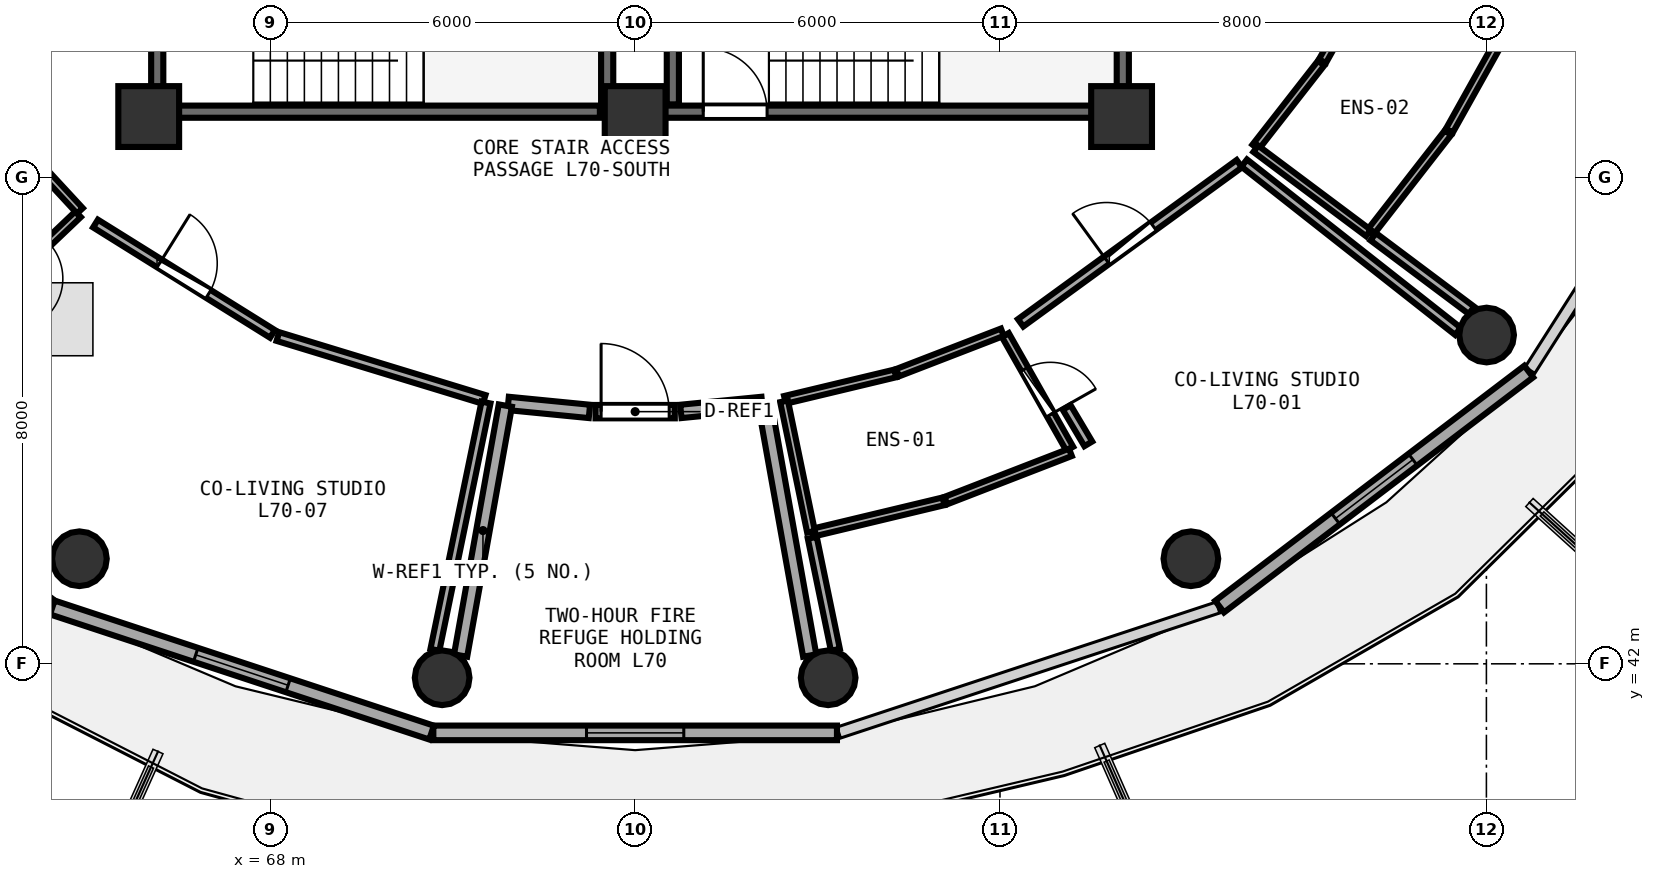
"""IFC4 building model, lengths in metres.
Left out: names, types, materials, properties, quantities, classifications, styles, units other than length and angle.
Written with IfcOpenShell. Run it as: python <this file> out.ifc"""

import sys

from ifc_helpers import new_model, si_unit, direction, frame, frame_2d, origin, origin_2d, place, context, subcontext, project, spatial, rectangle, circle, extrude, element, fill, save


model = new_model("IFC4")
c1 = context("Model", 3, precision=1e-05, world=origin(), true_north=direction((0.0, 1.0)))
c2 = subcontext(c1, "Body", "Model", "MODEL_VIEW")
j1 = project(units=[si_unit("LENGTHUNIT", "METRE"), si_unit("PLANEANGLEUNIT", "RADIAN")], contexts=[c1])
p1 = place(None, origin())
s1 = spatial("IfcSite", under=j1, at=p1, CompositionType="ELEMENT")
p2 = place(p1, origin())
s2 = spatial("IfcBuilding", under=s1, at=p2, CompositionType="ELEMENT")
p3 = place(p2, frame((0.0, 0.0, 274.95)))
s3 = spatial("IfcBuildingStorey", under=s2, at=p3, CompositionType="ELEMENT", Elevation=274.95)
for number, where, z_axis, x_axis in (
    (1, (66.0, 51.0, 0.0), (0.0, 0.0, 1.0), (1.0, 0.0, 0.0)),
    (2, (74.0, 51.0, 0.0), (0.0, 0.0, 1.0), (1.0, 0.0, 0.0)),
    (3, (82.0, 51.0, 0.0), (0.0, 0.0, 1.0), (1.0, 0.0, 0.0)),
):
    element("IfcColumn", number, at=place(p3, frame(where, z_axis=z_axis, x_axis=x_axis)), inside=s3, PredefinedType="PILASTER", context=c2, shape_type="SweptSolid", body=[
        extrude(rectangle(XDim=1.0, YDim=1.0, at=origin_2d()), origin(), (0.0, 0.0, 1.0), 3.75),
    ])
for number, where, z_axis, x_axis in (
    (4, (64.86, 43.728, 0.0), (0.0, 0.0, 1.0), (1.0, 0.0, 0.0)),
    (5, (70.826, 41.771, 0.0), (0.0, 0.0, 1.0), (1.0, 0.0, 0.0)),
    (6, (77.174, 41.771, 0.0), (0.0, 0.0, 1.0), (1.0, 0.0, 0.0)),
    (7, (83.14, 43.728, 0.0), (0.0, 0.0, 1.0), (1.0, 0.0, 0.0)),
    (8, (88.003, 47.407, 0.0), (0.0, 0.0, 1.0), (1.0, 0.0, 0.0)),
):
    element("IfcColumn", number, at=place(p3, frame(where, z_axis=z_axis, x_axis=x_axis)), inside=s3, PredefinedType="COLUMN", context=c2, shape_type="SweptSolid", body=[
        extrude(circle(Radius=0.45, at=origin_2d()), origin(), (0.0, 0.0, 1.0), 3.75),
    ])
p4 = place(p3, frame((59.304, 46.806, 0.0), z_axis=(0.0, 0.0, 1.0), x_axis=(0.796010444211, -0.605282886514, 0.0)))
e9 = element("IfcWall", 9, at=p4, inside=s3, PredefinedType="SOLIDWALL", context=c2, shape_type="SweptSolid", body=[
    extrude(rectangle(XDim=6.387, YDim=0.24, at=frame_2d((3.194, 0.0))), origin(), (0.0, 0.0, 1.0), 3.475),
])
p5 = place(p4, frame((2.394, 0.0, 0.85)))
e10 = element("IfcOpeningElement", 10, at=p5, cuts=e9, PredefinedType="OPENING", context=c2, shape_type="SweptSolid", body=[
    extrude(rectangle(XDim=1.6, YDim=1.45, at=frame_2d((0.8, 0.725))), frame((0.0, 0.13, 0.0), z_axis=(0.0, -1.0, 0.0), x_axis=(1.0, 0.0, 0.0)), (0.0, 0.0, 1.0), 0.26),
])
p6 = place(p3, frame((64.414, 42.927, 0.0), z_axis=(0.0, 0.0, 1.0), x_axis=(0.949663708393, -0.313271193954, 0.0)))
e11 = element("IfcWall", 11, at=p6, inside=s3, PredefinedType="SOLIDWALL", context=c2, shape_type="SweptSolid", body=[
    extrude(rectangle(XDim=6.568, YDim=0.24, at=frame_2d((3.284, 0.0))), origin(), (0.0, 0.0, 1.0), 3.475),
])
p7 = place(p6, frame((2.484, 0.0, 0.85)))
e12 = element("IfcOpeningElement", 12, at=p7, cuts=e11, PredefinedType="OPENING", context=c2, shape_type="SweptSolid", body=[
    extrude(rectangle(XDim=1.6, YDim=1.45, at=frame_2d((0.8, 0.725))), frame((0.0, 0.13, 0.0), z_axis=(0.0, -1.0, 0.0), x_axis=(1.0, 0.0, 0.0)), (0.0, 0.0, 1.0), 0.26),
])
p8 = place(p3, frame((70.681, 40.864, 0.0), z_axis=(0.0, 0.0, 1.0), x_axis=(1.0, 0.0, 0.0)))
e13 = element("IfcWall", 13, at=p8, inside=s3, PredefinedType="SOLIDWALL", context=c2, shape_type="SweptSolid", body=[
    extrude(rectangle(XDim=6.638, YDim=0.24, at=frame_2d((3.319, 0.0))), origin(), (0.0, 0.0, 1.0), 3.475),
])
p9 = place(p8, frame((2.519, 0.0, 0.85)))
e14 = element("IfcOpeningElement", 14, at=p9, cuts=e13, PredefinedType="OPENING", context=c2, shape_type="SweptSolid", body=[
    extrude(rectangle(XDim=1.6, YDim=1.45, at=frame_2d((0.8, 0.725))), frame((0.0, 0.13, 0.0), z_axis=(0.0, -1.0, 0.0), x_axis=(1.0, 0.0, 0.0)), (0.0, 0.0, 1.0), 0.26),
])
p10 = place(p3, frame((83.612, 42.94, 0.0), z_axis=(0.0, 0.0, 1.0), x_axis=(0.796010444211, 0.605282886514, 0.0)))
e15 = element("IfcWall", 15, at=p10, inside=s3, PredefinedType="SOLIDWALL", context=c2, shape_type="SweptSolid", body=[
    extrude(rectangle(XDim=6.387, YDim=0.24, at=frame_2d((3.194, 0.0))), origin(), (0.0, 0.0, 1.0), 3.475),
])
p11 = place(p10, frame((2.394, 0.0, 0.85)))
e16 = element("IfcOpeningElement", 16, at=p11, cuts=e15, PredefinedType="OPENING", context=c2, shape_type="SweptSolid", body=[
    extrude(rectangle(XDim=1.6, YDim=1.45, at=frame_2d((0.8, 0.725))), frame((0.0, 0.13, 0.0), z_axis=(0.0, -1.0, 0.0), x_axis=(1.0, 0.0, 0.0)), (0.0, 0.0, 1.0), 0.26),
])
p12 = place(p3, frame((74.0, 51.08, 0.0), z_axis=(0.0, 0.0, 1.0), x_axis=(1.0, 0.0, 0.0)))
e17 = element("IfcWall", 17, at=p12, inside=s3, PredefinedType="SHEAR", context=c2, shape_type="SweptSolid", body=[
    extrude(rectangle(XDim=7.9, YDim=0.2, at=frame_2d((3.95, 0.0))), origin(), (0.0, 0.0, 1.0), 3.49),
])
p13 = place(p12, frame((1.12, 0.0, 0.0)))
e18 = element("IfcOpeningElement", 18, at=p13, cuts=e17, PredefinedType="OPENING", context=c2, shape_type="SweptSolid", body=[
    extrude(rectangle(XDim=1.05, YDim=2.1, at=frame_2d((0.525, 1.05))), frame((0.0, 0.11, 0.0), z_axis=(0.0, -1.0, 0.0), x_axis=(1.0, 0.0, 0.0)), (0.0, 0.0, 1.0), 0.22),
])
for number, where, z_axis, x_axis in (
    (19, (82.02, 51.2, 0.0), (0.0, 0.0, 1.0), (0.0, 1.0, 0.0)),
    (20, (74.62, 54.27, 0.0), (0.0, 0.0, 1.0), (0.0, -1.0, 0.0)),
):
    element("IfcWall", number, at=place(p3, frame(where, z_axis=z_axis, x_axis=x_axis)), inside=s3, PredefinedType="SHEAR", context=c2, shape_type="SweptSolid", body=[
        extrude(rectangle(XDim=3.07, YDim=0.2, at=frame_2d((1.535, 0.0))), origin(), (0.0, 0.0, 1.0), 3.49),
    ])
p14 = place(p3, frame((66.26, 51.08, 0.0), z_axis=(0.0, 0.0, 1.0), x_axis=(1.0, 0.0, 0.0)))
e21 = element("IfcWall", 21, at=p14, inside=s3, PredefinedType="SHEAR", context=c2, shape_type="SweptSolid", body=[
    extrude(rectangle(XDim=7.16, YDim=0.2, at=frame_2d((3.58, 0.0))), origin(), (0.0, 0.0, 1.0), 3.49),
])
p15 = place(p3, frame((73.54, 51.2, 0.0), z_axis=(0.0, 0.0, 1.0), x_axis=(0.0, 1.0, 0.0)))
e22 = element("IfcWall", 22, at=p15, inside=s3, PredefinedType="SHEAR", context=c2, shape_type="SweptSolid", body=[
    extrude(rectangle(XDim=3.07, YDim=0.2, at=frame_2d((1.535, 0.0))), origin(), (0.0, 0.0, 1.0), 3.49),
])
p16 = place(p3, frame((66.14, 54.27, 0.0), z_axis=(0.0, 0.0, 1.0), x_axis=(0.0, -1.0, 0.0)))
e23 = element("IfcWall", 23, at=p16, inside=s3, PredefinedType="SHEAR", context=c2, shape_type="SweptSolid", body=[
    extrude(rectangle(XDim=3.07, YDim=0.2, at=frame_2d((1.535, 0.0))), origin(), (0.0, 0.0, 1.0), 3.49),
])
p17 = place(p16, frame((1.01, 0.0, 0.0)))
e24 = element("IfcOpeningElement", 24, at=p17, cuts=e23, PredefinedType="OPENING", context=c2, shape_type="SweptSolid", body=[
    extrude(rectangle(XDim=1.05, YDim=2.1, at=frame_2d((0.525, 1.05))), frame((0.0, 0.11, 0.0), z_axis=(0.0, -1.0, 0.0), x_axis=(1.0, 0.0, 0.0)), (0.0, 0.0, 1.0), 0.22),
])
p18 = place(p3, frame((73.348, 46.147, 0.0), z_axis=(0.0, 0.0, 1.0), x_axis=(1.0, 0.0, 0.0)))
e25 = element("IfcWall", 25, at=p18, inside=s3, PredefinedType="SOLIDWALL", context=c2, shape_type="SweptSolid", body=[
    extrude(rectangle(XDim=1.304, YDim=0.22, at=frame_2d((0.652, 0.0))), origin(), (0.0, 0.0, 1.0), 3.48),
])
p19 = place(p18, frame((0.092, 0.0, 0.0)))
e26 = element("IfcOpeningElement", 26, at=p19, cuts=e25, PredefinedType="OPENING", context=c2, shape_type="SweptSolid", body=[
    extrude(rectangle(XDim=1.12, YDim=2.1, at=frame_2d((0.56, 1.05))), frame((0.0, 0.12, 0.0), z_axis=(0.0, -1.0, 0.0), x_axis=(1.0, 0.0, 0.0)), (0.0, 0.0, 1.0), 0.24),
])
p20 = place(p3, frame((80.088, 47.408, 0.0), z_axis=(0.0, 0.0, 1.0), x_axis=(0.492943806894, -0.870061149141, 0.0)))
e27 = element("IfcWall", 27, at=p20, inside=s3, PredefinedType="PLUMBINGWALL", context=c2, shape_type="SweptSolid", body=[
    extrude(rectangle(XDim=2.15, YDim=0.13, at=frame_2d((1.075, 0.0))), origin(), (0.0, 0.0, 1.0), 3.175),
])
p21 = place(p20, frame((0.645, 0.0, 0.0)))
e28 = element("IfcOpeningElement", 28, at=p21, cuts=e27, PredefinedType="OPENING", context=c2, shape_type="SweptSolid", body=[
    extrude(rectangle(XDim=0.86, YDim=2.05, at=frame_2d((0.43, 1.025))), frame((0.0, 0.075, 0.0), z_axis=(0.0, -1.0, 0.0), x_axis=(1.0, 0.0, 0.0)), (0.0, 0.0, 1.0), 0.15),
])
p22 = place(p3, frame((80.34, 47.607, 0.0), z_axis=(0.0, 0.0, 1.0), x_axis=(0.808603155837, 0.588354430909, 0.0)))
e29 = element("IfcWall", 29, at=p22, inside=s3, PredefinedType="PARTITIONING", context=c2, shape_type="SweptSolid", body=[
    extrude(rectangle(XDim=4.448, YDim=0.15, at=frame_2d((2.224, 0.0))), origin(), (0.0, 0.0, 1.0), 3.075),
])
p23 = place(p22, frame((1.749, 0.0, 0.0)))
e30 = element("IfcOpeningElement", 30, at=p23, cuts=e29, PredefinedType="OPENING", context=c2, shape_type="SweptSolid", body=[
    extrude(rectangle(XDim=0.95, YDim=2.08, at=frame_2d((0.475, 1.04))), frame((0.0, 0.085, 0.0), z_axis=(0.0, -1.0, 0.0), x_axis=(1.0, 0.0, 0.0)), (0.0, 0.0, 1.0), 0.17),
])
p24 = place(p3, frame((64.839, 49.394, 0.0), z_axis=(0.0, 0.0, 1.0), x_axis=(-0.724098470775, -0.689696603313, 0.0)))
e31 = element("IfcWall", 31, at=p24, inside=s3, PredefinedType="PLUMBINGWALL", context=c2, shape_type="SweptSolid", body=[
    extrude(rectangle(XDim=2.207, YDim=0.13, at=frame_2d((1.104, 0.0))), origin(), (0.0, 0.0, 1.0), 3.175),
])
p25 = place(p24, frame((0.674, 0.0, 0.0)))
e32 = element("IfcOpeningElement", 32, at=p25, cuts=e31, PredefinedType="OPENING", context=c2, shape_type="SweptSolid", body=[
    extrude(rectangle(XDim=0.86, YDim=2.05, at=frame_2d((0.43, 1.025))), frame((0.0, 0.075, 0.0), z_axis=(0.0, -1.0, 0.0), x_axis=(1.0, 0.0, 0.0)), (0.0, 0.0, 1.0), 0.15),
])
p26 = place(p3, frame((65.125, 49.24, 0.0), z_axis=(0.0, 0.0, 1.0), x_axis=(0.848573714942, -0.529077168578, 0.0)))
e33 = element("IfcWall", 33, at=p26, inside=s3, PredefinedType="PARTITIONING", context=c2, shape_type="SweptSolid", body=[
    extrude(rectangle(XDim=3.429, YDim=0.15, at=frame_2d((1.715, 0.0))), origin(), (0.0, 0.0, 1.0), 3.075),
])
p27 = place(p26, frame((1.24, 0.0, 0.0)))
e34 = element("IfcOpeningElement", 34, at=p27, cuts=e33, PredefinedType="OPENING", context=c2, shape_type="SweptSolid", body=[
    extrude(rectangle(XDim=0.95, YDim=2.08, at=frame_2d((0.475, 1.04))), frame((0.0, 0.085, 0.0), z_axis=(0.0, -1.0, 0.0), x_axis=(1.0, 0.0, 0.0)), (0.0, 0.0, 1.0), 0.17),
])
for number, where, z_axis, x_axis in (
    (35, (71.912, 46.282, 0.0), (0.0, 0.0, 1.0), (0.995, -0.098, 0.0)),
    (36, (74.752, 46.151, 0.0), (0.0, 0.0, 1.0), (0.995, 0.098, 0.0)),
):
    element("IfcWall", number, at=place(p3, frame(where, z_axis=z_axis, x_axis=x_axis)), inside=s3, PredefinedType="SOLIDWALL", context=c2, shape_type="SweptSolid", body=[
        extrude(rectangle(XDim=1.343, YDim=0.22, at=frame_2d((0.671, 0.0))), origin(), (0.0, 0.0, 1.0), 3.075),
    ])
for number, where, z_axis, x_axis in (
    (37, (76.135, 46.247, 0.0), (0.0, 0.0, 1.0), (0.176, -0.984, 0.0)),
    (38, (71.129, 42.136, 0.0), (0.0, 0.0, 1.0), (0.176, 0.984, 0.0)),
):
    element("IfcWall", number, at=place(p3, frame(where, z_axis=z_axis, x_axis=x_axis)), inside=s3, PredefinedType="SOLIDWALL", context=c2, shape_type="SweptSolid", body=[
        extrude(rectangle(XDim=4.176, YDim=0.22, at=frame_2d((2.088, 0.0))), origin(), (0.0, 0.0, 1.0), 3.075),
    ])
p28 = place(p3, frame((76.464, 46.341, 0.0), z_axis=(0.0, 0.0, 1.0), x_axis=(0.972460942093, 0.233065905066, 0.0)))
e39 = element("IfcWall", 39, at=p28, inside=s3, PredefinedType="PLUMBINGWALL", context=c2, shape_type="SweptSolid", body=[
    extrude(rectangle(XDim=1.865, YDim=0.13, at=frame_2d((0.932, 0.0))), origin(), (0.0, 0.0, 1.0), 3.48),
])
p29 = place(p3, frame((78.316, 46.787, 0.0), z_axis=(0.0, 0.0, 1.0), x_axis=(0.932830435446, 0.360315665363, 0.0)))
e40 = element("IfcWall", 40, at=p29, inside=s3, PredefinedType="PLUMBINGWALL", context=c2, shape_type="SweptSolid", body=[
    extrude(rectangle(XDim=1.848, YDim=0.13, at=frame_2d((0.924, 0.0))), origin(), (0.0, 0.0, 1.0), 3.48),
])
p30 = place(p3, frame((81.158, 45.478, 0.0), z_axis=(0.0, 0.0, 1.0), x_axis=(-0.932475153314, -0.361234118616, 0.0)))
e41 = element("IfcWall", 41, at=p30, inside=s3, PredefinedType="PLUMBINGWALL", context=c2, shape_type="SweptSolid", body=[
    extrude(rectangle(XDim=2.197, YDim=0.13, at=frame_2d((1.099, 0.0))), origin(), (0.0, 0.0, 1.0), 3.48),
])
p31 = place(p3, frame((79.072, 44.672, 0.0), z_axis=(0.0, 0.0, 1.0), x_axis=(-0.972449268181, -0.233114608754, 0.0)))
e42 = element("IfcWall", 42, at=p31, inside=s3, PredefinedType="PLUMBINGWALL", context=c2, shape_type="SweptSolid", body=[
    extrude(rectangle(XDim=2.216, YDim=0.13, at=frame_2d((1.108, 0.0))), origin(), (0.0, 0.0, 1.0), 3.48),
])
p32 = place(p3, frame((76.893, 44.171, 0.0), z_axis=(0.0, 0.0, 1.0), x_axis=(-0.202454539756, 0.979291662035, 0.0)))
e43 = element("IfcWall", 43, at=p32, inside=s3, PredefinedType="PLUMBINGWALL", context=c2, shape_type="SweptSolid", body=[
    extrude(rectangle(XDim=2.191, YDim=0.13, at=frame_2d((1.096, 0.0))), origin(), (0.0, 0.0, 1.0), 3.175),
])
p33 = place(p3, frame((84.016, 50.235, 0.0), z_axis=(0.0, 0.0, 1.0), x_axis=(0.785736749878, -0.618561039745, 0.0)))
e44 = element("IfcWall", 44, at=p33, inside=s3, PredefinedType="PARTITIONING", context=c2, shape_type="SweptSolid", body=[
    extrude(rectangle(XDim=4.475, YDim=0.15, at=frame_2d((2.237, 0.0))), origin(), (0.0, 0.0, 1.0), 3.075),
])
p34 = place(p3, frame((77.293, 42.23, 0.0), z_axis=(0.0, 0.0, 1.0), x_axis=(-0.20217648155, 0.979349105431, 0.0)))
e45 = element("IfcWall", 45, at=p34, inside=s3, PredefinedType="PARTITIONING", context=c2, shape_type="SweptSolid", body=[
    extrude(rectangle(XDim=1.881, YDim=0.15, at=frame_2d((0.941, 0.0))), origin(), (0.0, 0.0, 1.0), 3.235),
])
p35 = place(p3, frame((81.453, 45.617, 0.0), z_axis=(0.0, 0.0, 1.0), x_axis=(-0.510879205684, 0.859652509564, 0.0)))
e46 = element("IfcWall", 46, at=p35, inside=s3, PredefinedType="PARTITIONING", context=c2, shape_type="SweptSolid", body=[
    extrude(rectangle(XDim=0.696, YDim=0.15, at=frame_2d((0.348, 0.0))), origin(), (0.0, 0.0, 1.0), 3.175),
])
p36 = place(p3, frame((84.203, 50.498, 0.0), z_axis=(0.0, 0.0, 1.0), x_axis=(0.615627813602, 0.78803705187, 0.0)))
e47 = element("IfcWall", 47, at=p36, inside=s3, PredefinedType="PLUMBINGWALL", context=c2, shape_type="SweptSolid", body=[
    extrude(rectangle(XDim=1.752, YDim=0.13, at=frame_2d((0.876, 0.0))), origin(), (0.0, 0.0, 1.0), 3.075),
])
p37 = place(p3, frame((85.304, 51.911, 0.0), z_axis=(0.0, 0.0, 1.0), x_axis=(0.488642128311, 0.872484309566, 0.0)))
e48 = element("IfcWall", 48, at=p37, inside=s3, PredefinedType="PLUMBINGWALL", context=c2, shape_type="SweptSolid", body=[
    extrude(rectangle(XDim=1.726, YDim=0.13, at=frame_2d((0.863, 0.0))), origin(), (0.0, 0.0, 1.0), 3.235),
])
p38 = place(p3, frame((88.394, 52.562, 0.0), z_axis=(0.0, 0.0, 1.0), x_axis=(-0.487959720546, -0.872866147313, 0.0)))
e49 = element("IfcWall", 49, at=p38, inside=s3, PredefinedType="PLUMBINGWALL", context=c2, shape_type="SweptSolid", body=[
    extrude(rectangle(XDim=2.056, YDim=0.13, at=frame_2d((1.028, 0.0))), origin(), (0.0, 0.0, 1.0), 3.075),
])
p39 = place(p3, frame((87.369, 50.734, 0.0), z_axis=(0.0, 0.0, 1.0), x_axis=(-0.614418714287, -0.788980128732, 0.0)))
e50 = element("IfcWall", 50, at=p39, inside=s3, PredefinedType="PLUMBINGWALL", context=c2, shape_type="SweptSolid", body=[
    extrude(rectangle(XDim=2.085, YDim=0.13, at=frame_2d((1.042, 0.0))), origin(), (0.0, 0.0, 1.0), 3.48),
])
p40 = place(p3, frame((86.059, 49.085, 0.0), z_axis=(0.0, 0.0, 1.0), x_axis=(-0.800835318147, 0.598884624288, 0.0)))
e51 = element("IfcWall", 51, at=p40, inside=s3, PredefinedType="PLUMBINGWALL", context=c2, shape_type="SweptSolid", body=[
    extrude(rectangle(XDim=2.313, YDim=0.13, at=frame_2d((1.156, 0.0))), origin(), (0.0, 0.0, 1.0), 3.175),
])
p41 = place(p3, frame((87.756, 47.812, 0.0), z_axis=(0.0, 0.0, 1.0), x_axis=(-0.800376717426, 0.599497381314, 0.0)))
e52 = element("IfcWall", 52, at=p41, inside=s3, PredefinedType="PARTITIONING", context=c2, shape_type="SweptSolid", body=[
    extrude(rectangle(XDim=2.021, YDim=0.15, at=frame_2d((1.011, 0.0))), origin(), (0.0, 0.0, 1.0), 3.235),
])
p42 = place(p3, frame((63.024, 51.444, 0.0), z_axis=(0.0, 0.0, 1.0), x_axis=(0.678981447207, -0.734155429285, 0.0)))
e53 = element("IfcWall", 53, at=p42, inside=s3, PredefinedType="PLUMBINGWALL", context=c2, shape_type="SweptSolid", body=[
    extrude(rectangle(XDim=2.717, YDim=0.13, at=frame_2d((1.358, 0.0))), origin(), (0.0, 0.0, 1.0), 3.075),
])
p43 = place(p3, frame((68.124, 47.382, 0.0), z_axis=(0.0, 0.0, 1.0), x_axis=(0.956499471214, -0.291734059662, 0.0)))
e54 = element("IfcWall", 54, at=p43, inside=s3, PredefinedType="PARTITIONING", context=c2, shape_type="SweptSolid", body=[
    extrude(rectangle(XDim=3.547, YDim=0.15, at=frame_2d((1.773, 0.0))), origin(), (0.0, 0.0, 1.0), 3.48),
])
p44 = place(p3, frame((71.547, 46.297, 0.0), z_axis=(0.0, 0.0, 1.0), x_axis=(-0.202308141573, -0.979321916355, 0.0)))
e55 = element("IfcWall", 55, at=p44, inside=s3, PredefinedType="PARTITIONING", context=c2, shape_type="SweptSolid", body=[
    extrude(rectangle(XDim=4.153, YDim=0.15, at=frame_2d((2.076, 0.0))), origin(), (0.0, 0.0, 1.0), 3.175),
])
p45 = place(p7, origin())
e56 = element("IfcWindow", 56, at=p45, inside=s3, PartitioningType="SINGLE_PANEL", PredefinedType="WINDOW", context=c2, shape_type="SweptSolid", body=[
    extrude(rectangle(XDim=1.6, YDim=1.45, at=frame_2d((0.8, 0.725))), frame((0.0, 0.03, 0.0), z_axis=(0.0, -1.0, 0.0), x_axis=(1.0, 0.0, 0.0)), (0.0, 0.0, 1.0), 0.06),
])
fill(e12, e56)
p46 = place(p9, origin())
e57 = element("IfcWindow", 57, at=p46, inside=s3, PartitioningType="SINGLE_PANEL", PredefinedType="WINDOW", context=c2, shape_type="SweptSolid", body=[
    extrude(rectangle(XDim=1.6, YDim=1.45, at=frame_2d((0.8, 0.725))), frame((0.0, 0.03, 0.0), z_axis=(0.0, -1.0, 0.0), x_axis=(1.0, 0.0, 0.0)), (0.0, 0.0, 1.0), 0.06),
])
fill(e14, e57)
p47 = place(p11, origin())
e58 = element("IfcWindow", 58, at=p47, inside=s3, PartitioningType="SINGLE_PANEL", PredefinedType="WINDOW", context=c2, shape_type="SweptSolid", body=[
    extrude(rectangle(XDim=1.6, YDim=1.45, at=frame_2d((0.8, 0.725))), frame((0.0, 0.03, 0.0), z_axis=(0.0, -1.0, 0.0), x_axis=(1.0, 0.0, 0.0)), (0.0, 0.0, 1.0), 0.06),
])
fill(e16, e58)
p48 = place(p13, origin())
e59 = element("IfcDoor", 59, at=p48, inside=s3, OperationType="SINGLE_SWING_LEFT", PredefinedType="DOOR", context=c2, shape_type="SweptSolid", body=[
    extrude(rectangle(XDim=1.05, YDim=2.1, at=frame_2d((0.525, 1.05))), frame((0.0, 0.025, 0.0), z_axis=(0.0, -1.0, 0.0), x_axis=(1.0, 0.0, 0.0)), (0.0, 0.0, 1.0), 0.05),
])
fill(e18, e59)
p49 = place(p19, origin())
e60 = element("IfcDoor", 60, at=p49, inside=s3, OperationType="SINGLE_SWING_LEFT", PredefinedType="DOOR", context=c2, shape_type="SweptSolid", body=[
    extrude(rectangle(XDim=1.12, YDim=2.1, at=frame_2d((0.56, 1.05))), frame((0.0, 0.025, 0.0), z_axis=(0.0, -1.0, 0.0), x_axis=(1.0, 0.0, 0.0)), (0.0, 0.0, 1.0), 0.05),
])
fill(e26, e60)
p50 = place(p21, origin())
e61 = element("IfcDoor", 61, at=p50, inside=s3, OperationType="SINGLE_SWING_RIGHT", PredefinedType="DOOR", context=c2, shape_type="SweptSolid", body=[
    extrude(rectangle(XDim=0.86, YDim=2.05, at=frame_2d((0.43, 1.025))), frame((0.0, 0.025, 0.0), z_axis=(0.0, -1.0, 0.0), x_axis=(1.0, 0.0, 0.0)), (0.0, 0.0, 1.0), 0.05),
])
fill(e28, e61)
p51 = place(p23, origin())
e62 = element("IfcDoor", 62, at=p51, inside=s3, OperationType="SINGLE_SWING_LEFT", PredefinedType="DOOR", context=c2, shape_type="SweptSolid", body=[
    extrude(rectangle(XDim=0.95, YDim=2.08, at=frame_2d((0.475, 1.04))), frame((0.0, 0.025, 0.0), z_axis=(0.0, -1.0, 0.0), x_axis=(1.0, 0.0, 0.0)), (0.0, 0.0, 1.0), 0.05),
])
fill(e30, e62)
p52 = place(p27, origin())
e63 = element("IfcDoor", 63, at=p52, inside=s3, OperationType="SINGLE_SWING_LEFT", PredefinedType="DOOR", context=c2, shape_type="SweptSolid", body=[
    extrude(rectangle(XDim=0.95, YDim=2.08, at=frame_2d((0.475, 1.04))), frame((0.0, 0.025, 0.0), z_axis=(0.0, -1.0, 0.0), x_axis=(1.0, 0.0, 0.0)), (0.0, 0.0, 1.0), 0.05),
])
fill(e34, e63)
save(model, sys.argv[1])
